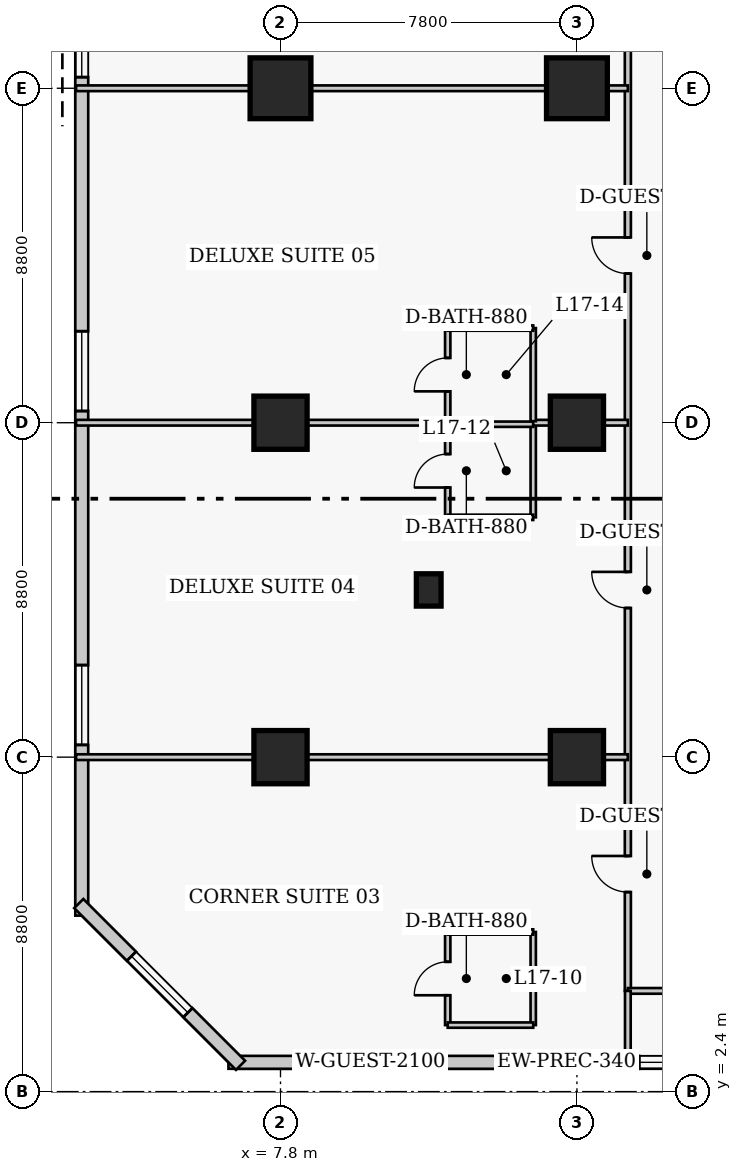
"""IFC4 building model, lengths in metres.
Left out: names, types, materials, properties, quantities, classifications, styles, units other than length and angle.
Written with IfcOpenShell. Run it as: python <this file> out.ifc"""

import sys

from ifc_helpers import new_model, si_unit, direction, frame, frame_2d, origin, origin_2d, place, context, subcontext, project, spatial, rectangle, extrude, element, fill, save


model = new_model("IFC4")
c1 = context("Model", 3, precision=1e-05, world=origin(), true_north=direction((0.0, 1.0)))
c2 = subcontext(c1, "Body", "Model", "MODEL_VIEW")
j1 = project(units=[si_unit("LENGTHUNIT", "METRE"), si_unit("PLANEANGLEUNIT", "RADIAN")], contexts=[c1])
p1 = place(None, origin())
s1 = spatial("IfcSite", under=j1, at=p1, CompositionType="ELEMENT")
p2 = place(p1, origin())
s2 = spatial("IfcBuilding", under=s1, at=p2, CompositionType="ELEMENT")
p3 = place(p2, frame((0.0, 0.0, 71.6)))
s3 = spatial("IfcBuildingStorey", under=s2, at=p3, CompositionType="ELEMENT", Elevation=71.6)
for number, where, z_axis, x_axis in (
    (1, (7.8, 11.2, 0.0), (0.0, 0.0, 1.0), (1.0, 0.0, 0.0)),
    (2, (7.8, 20.0, 0.0), (0.0, 0.0, 1.0), (1.0, 0.0, 0.0)),
):
    element("IfcColumn", number, at=place(p3, frame(where, z_axis=z_axis, x_axis=x_axis)), inside=s3, PredefinedType="COLUMN", context=c2, shape_type="SweptSolid", body=[
        extrude(rectangle(XDim=1.4, YDim=1.4, at=origin_2d()), origin(), (0.0, 0.0, 1.0), 3.8),
    ])
p4 = place(p3, frame((7.8, 28.8, 0.0), z_axis=(0.0, 0.0, 1.0), x_axis=(1.0, 0.0, 0.0)))
e3 = element("IfcColumn", 3, at=p4, inside=s3, PredefinedType="COLUMN", context=c2, shape_type="SweptSolid", body=[
    extrude(rectangle(XDim=1.6, YDim=1.6, at=origin_2d()), origin(), (0.0, 0.0, 1.0), 3.8),
])
for number, where, z_axis, x_axis in (
    (4, (15.6, 11.2, 0.0), (0.0, 0.0, 1.0), (1.0, 0.0, 0.0)),
    (5, (15.6, 20.0, 0.0), (0.0, 0.0, 1.0), (1.0, 0.0, 0.0)),
):
    element("IfcColumn", number, at=place(p3, frame(where, z_axis=z_axis, x_axis=x_axis)), inside=s3, PredefinedType="COLUMN", context=c2, shape_type="SweptSolid", body=[
        extrude(rectangle(XDim=1.4, YDim=1.4, at=origin_2d()), origin(), (0.0, 0.0, 1.0), 3.8),
    ])
p5 = place(p3, frame((15.6, 28.8, 0.0), z_axis=(0.0, 0.0, 1.0), x_axis=(1.0, 0.0, 0.0)))
e6 = element("IfcColumn", 6, at=p5, inside=s3, PredefinedType="COLUMN", context=c2, shape_type="SweptSolid", body=[
    extrude(rectangle(XDim=1.6, YDim=1.6, at=origin_2d()), origin(), (0.0, 0.0, 1.0), 3.8),
])
p6 = place(p3, frame((11.7, 15.6, 0.0), z_axis=(0.0, 0.0, 1.0), x_axis=(1.0, 0.0, 0.0)))
e7 = element("IfcColumn", 7, at=p6, inside=s3, PredefinedType="PILASTER", context=c2, shape_type="SweptSolid", body=[
    extrude(rectangle(XDim=0.65, YDim=0.85, at=origin_2d()), origin(), (0.0, 0.0, 1.0), 3.8),
])
p7 = place(p3, frame((6.43, 3.17, 0.0), z_axis=(0.0, 0.0, 1.0), x_axis=(1.0, 0.0, 0.0)))
e8 = element("IfcWall", 8, at=p7, inside=s3, PredefinedType="SOLIDWALL", context=c2, shape_type="SweptSolid", body=[
    extrude(rectangle(XDim=29.89, YDim=0.34, at=frame_2d((14.945, 0.0))), origin(), (0.0, 0.0, 1.0), 3.42),
])
p8 = place(p7, frame((20.17, 0.0, 0.0)))
e9 = element("IfcOpeningElement", 9, at=p8, cuts=e8, PredefinedType="OPENING", context=c2, shape_type="SweptSolid", body=[
    extrude(rectangle(XDim=1.4, YDim=2.15, at=frame_2d((0.7, 1.075))), frame((0.0, 0.18, 0.0), z_axis=(0.0, -1.0, 0.0), x_axis=(1.0, 0.0, 0.0)), (0.0, 0.0, 1.0), 0.36),
])
p9 = place(p7, frame((2.686, 0.0, 0.85)))
e10 = element("IfcOpeningElement", 10, at=p9, cuts=e8, PredefinedType="OPENING", context=c2, shape_type="SweptSolid", body=[
    extrude(rectangle(XDim=2.1, YDim=1.85, at=frame_2d((1.05, 0.925))), frame((0.0, 0.18, 0.0), z_axis=(0.0, -1.0, 0.0), x_axis=(1.0, 0.0, 0.0)), (0.0, 0.0, 1.0), 0.36),
])
p10 = place(p7, frame((10.809, 0.0, 0.85)))
e11 = element("IfcOpeningElement", 11, at=p10, cuts=e8, PredefinedType="OPENING", context=c2, shape_type="SweptSolid", body=[
    extrude(rectangle(XDim=2.1, YDim=1.85, at=frame_2d((1.05, 0.925))), frame((0.0, 0.18, 0.0), z_axis=(0.0, -1.0, 0.0), x_axis=(1.0, 0.0, 0.0)), (0.0, 0.0, 1.0), 0.36),
])
p11 = place(p7, frame((16.981, 0.0, 0.85)))
e12 = element("IfcOpeningElement", 12, at=p11, cuts=e8, PredefinedType="OPENING", context=c2, shape_type="SweptSolid", body=[
    extrude(rectangle(XDim=2.1, YDim=1.85, at=frame_2d((1.05, 0.925))), frame((0.0, 0.18, 0.0), z_axis=(0.0, -1.0, 0.0), x_axis=(1.0, 0.0, 0.0)), (0.0, 0.0, 1.0), 0.36),
])
p12 = place(p7, frame((25.104, 0.0, 0.85)))
e13 = element("IfcOpeningElement", 13, at=p12, cuts=e8, PredefinedType="OPENING", context=c2, shape_type="SweptSolid", body=[
    extrude(rectangle(XDim=2.1, YDim=1.85, at=frame_2d((1.05, 0.925))), frame((0.0, 0.18, 0.0), z_axis=(0.0, -1.0, 0.0), x_axis=(1.0, 0.0, 0.0)), (0.0, 0.0, 1.0), 0.36),
])
p13 = place(p3, frame((2.57, 42.17, 0.0), z_axis=(0.0, 0.0, 1.0), x_axis=(0.0, -1.0, 0.0)))
e14 = element("IfcWall", 14, at=p13, inside=s3, PredefinedType="SOLIDWALL", context=c2, shape_type="SweptSolid", body=[
    extrude(rectangle(XDim=35.14, YDim=0.34, at=frame_2d((17.57, 0.0))), origin(), (0.0, 0.0, 1.0), 3.42),
])
p14 = place(p13, frame((3.343, 0.0, 0.85)))
e15 = element("IfcOpeningElement", 15, at=p14, cuts=e14, PredefinedType="OPENING", context=c2, shape_type="SweptSolid", body=[
    extrude(rectangle(XDim=2.1, YDim=1.85, at=frame_2d((1.05, 0.925))), frame((0.0, 0.18, 0.0), z_axis=(0.0, -1.0, 0.0), x_axis=(1.0, 0.0, 0.0)), (0.0, 0.0, 1.0), 0.36),
])
p15 = place(p13, frame((10.978, 0.0, 0.85)))
e16 = element("IfcOpeningElement", 16, at=p15, cuts=e14, PredefinedType="OPENING", context=c2, shape_type="SweptSolid", body=[
    extrude(rectangle(XDim=2.1, YDim=1.85, at=frame_2d((1.05, 0.925))), frame((0.0, 0.18, 0.0), z_axis=(0.0, -1.0, 0.0), x_axis=(1.0, 0.0, 0.0)), (0.0, 0.0, 1.0), 0.36),
])
p16 = place(p13, frame((19.762, 0.0, 0.85)))
e17 = element("IfcOpeningElement", 17, at=p16, cuts=e14, PredefinedType="OPENING", context=c2, shape_type="SweptSolid", body=[
    extrude(rectangle(XDim=2.1, YDim=1.85, at=frame_2d((1.05, 0.925))), frame((0.0, 0.18, 0.0), z_axis=(0.0, -1.0, 0.0), x_axis=(1.0, 0.0, 0.0)), (0.0, 0.0, 1.0), 0.36),
])
p17 = place(p13, frame((28.548, 0.0, 0.85)))
e18 = element("IfcOpeningElement", 18, at=p17, cuts=e14, PredefinedType="OPENING", context=c2, shape_type="SweptSolid", body=[
    extrude(rectangle(XDim=2.1, YDim=1.85, at=frame_2d((1.05, 0.925))), frame((0.0, 0.18, 0.0), z_axis=(0.0, -1.0, 0.0), x_axis=(1.0, 0.0, 0.0)), (0.0, 0.0, 1.0), 0.36),
])
p18 = place(p3, frame((2.492, 7.348, 0.0), z_axis=(0.0, 0.0, 1.0), x_axis=(0.707106781187, -0.707106781187, 0.0)))
e19 = element("IfcWall", 19, at=p18, inside=s3, PredefinedType="SOLIDWALL", context=c2, shape_type="SweptSolid", body=[
    extrude(rectangle(XDim=6.02, YDim=0.34, at=frame_2d((3.01, 0.0))), origin(), (0.0, 0.0, 1.0), 3.42),
])
p19 = place(p18, frame((1.96, 0.0, 0.85)))
e20 = element("IfcOpeningElement", 20, at=p19, cuts=e19, PredefinedType="OPENING", context=c2, shape_type="SweptSolid", body=[
    extrude(rectangle(XDim=2.1, YDim=1.85, at=frame_2d((1.05, 0.925))), frame((0.0, 0.18, 0.0), z_axis=(0.0, -1.0, 0.0), x_axis=(1.0, 0.0, 0.0)), (0.0, 0.0, 1.0), 0.36),
])
p20 = place(p3, frame((16.94, 5.05, 0.0), z_axis=(0.0, 0.0, 1.0), x_axis=(0.0, 1.0, 0.0)))
e21 = element("IfcWall", 21, at=p20, inside=s3, PredefinedType="PARTITIONING", context=c2, shape_type="SweptSolid", body=[
    extrude(rectangle(XDim=35.6, YDim=0.16, at=frame_2d((17.8, 0.0))), origin(), (0.0, 0.0, 1.0), 3.42),
])
p21 = place(p20, frame((2.6, 0.0, 0.0)))
e22 = element("IfcOpeningElement", 22, at=p21, cuts=e21, PredefinedType="OPENING", context=c2, shape_type="SweptSolid", body=[
    extrude(rectangle(XDim=0.95, YDim=2.1, at=frame_2d((0.475, 1.05))), frame((0.0, 0.09, 0.0), z_axis=(0.0, -1.0, 0.0), x_axis=(1.0, 0.0, 0.0)), (0.0, 0.0, 1.0), 0.18),
])
p22 = place(p20, frame((10.075, 0.0, 0.0)))
e23 = element("IfcOpeningElement", 23, at=p22, cuts=e21, PredefinedType="OPENING", context=c2, shape_type="SweptSolid", body=[
    extrude(rectangle(XDim=0.95, YDim=2.1, at=frame_2d((0.475, 1.05))), frame((0.0, 0.09, 0.0), z_axis=(0.0, -1.0, 0.0), x_axis=(1.0, 0.0, 0.0)), (0.0, 0.0, 1.0), 0.18),
])
p23 = place(p20, frame((18.875, 0.0, 0.0)))
e24 = element("IfcOpeningElement", 24, at=p23, cuts=e21, PredefinedType="OPENING", context=c2, shape_type="SweptSolid", body=[
    extrude(rectangle(XDim=0.95, YDim=2.1, at=frame_2d((0.475, 1.05))), frame((0.0, 0.09, 0.0), z_axis=(0.0, -1.0, 0.0), x_axis=(1.0, 0.0, 0.0)), (0.0, 0.0, 1.0), 0.18),
])
p24 = place(p20, frame((26.925, 0.0, 0.0)))
e25 = element("IfcOpeningElement", 25, at=p24, cuts=e21, PredefinedType="OPENING", context=c2, shape_type="SweptSolid", body=[
    extrude(rectangle(XDim=0.95, YDim=2.1, at=frame_2d((0.475, 1.05))), frame((0.0, 0.09, 0.0), z_axis=(0.0, -1.0, 0.0), x_axis=(1.0, 0.0, 0.0)), (0.0, 0.0, 1.0), 0.18),
])
p25 = place(p20, frame((34.16, 0.0, 0.0)))
e26 = element("IfcOpeningElement", 26, at=p25, cuts=e21, PredefinedType="OPENING", context=c2, shape_type="SweptSolid", body=[
    extrude(rectangle(XDim=1.0, YDim=2.15, at=frame_2d((0.5, 1.075))), frame((0.0, 0.09, 0.0), z_axis=(0.0, -1.0, 0.0), x_axis=(1.0, 0.0, 0.0)), (0.0, 0.0, 1.0), 0.18),
])
p26 = place(p3, frame((16.94, 5.05, 0.0), z_axis=(0.0, 0.0, 1.0), x_axis=(1.0, 0.0, 0.0)))
e27 = element("IfcWall", 27, at=p26, inside=s3, PredefinedType="PARTITIONING", context=c2, shape_type="SweptSolid", body=[
    extrude(rectangle(XDim=2.22, YDim=0.15, at=frame_2d((1.11, 0.0))), origin(), (0.0, 0.0, 1.0), 3.42),
])
p27 = place(p3, frame((16.94, 3.02, 0.0), z_axis=(0.0, 0.0, 1.0), x_axis=(0.0, 1.0, 0.0)))
e28 = element("IfcWall", 28, at=p27, inside=s3, PredefinedType="PARTITIONING", context=c2, shape_type="SweptSolid", body=[
    extrude(rectangle(XDim=2.03, YDim=0.15, at=frame_2d((1.015, 0.0))), origin(), (0.0, 0.0, 1.0), 3.42),
])
p28 = place(p3, frame((12.2, 4.15, 0.0), z_axis=(0.0, 0.0, 1.0), x_axis=(0.0, 1.0, 0.0)))
e29 = element("IfcWall", 29, at=p28, inside=s3, PredefinedType="PLUMBINGWALL", context=c2, shape_type="SweptSolid", body=[
    extrude(rectangle(XDim=2.45, YDim=0.14, at=frame_2d((1.225, 0.0))), origin(), (0.0, 0.0, 1.0), 3.42),
])
p29 = place(p28, frame((0.785, 0.0, 0.0)))
e30 = element("IfcOpeningElement", 30, at=p29, cuts=e29, PredefinedType="OPENING", context=c2, shape_type="SweptSolid", body=[
    extrude(rectangle(XDim=0.88, YDim=2.05, at=frame_2d((0.44, 1.025))), frame((0.0, 0.08, 0.0), z_axis=(0.0, -1.0, 0.0), x_axis=(1.0, 0.0, 0.0)), (0.0, 0.0, 1.0), 0.16),
])
p30 = place(p3, frame((14.45, 4.15, 0.0), z_axis=(0.0, 0.0, 1.0), x_axis=(0.0, 1.0, 0.0)))
e31 = element("IfcWall", 31, at=p30, inside=s3, PredefinedType="PLUMBINGWALL", context=c2, shape_type="SweptSolid", body=[
    extrude(rectangle(XDim=2.45, YDim=0.14, at=frame_2d((1.225, 0.0))), origin(), (0.0, 0.0, 1.0), 3.42),
])
for number, where, z_axis, x_axis in (
    (32, (12.2, 4.15, 0.0), (0.0, 0.0, 1.0), (1.0, 0.0, 0.0)),
    (33, (12.2, 6.6, 0.0), (0.0, 0.0, 1.0), (1.0, 0.0, 0.0)),
):
    element("IfcWall", number, at=place(p3, frame(where, z_axis=z_axis, x_axis=x_axis)), inside=s3, PredefinedType="PLUMBINGWALL", context=c2, shape_type="SweptSolid", body=[
        extrude(rectangle(XDim=2.25, YDim=0.14, at=frame_2d((1.125, 0.0))), origin(), (0.0, 0.0, 1.0), 3.42),
    ])
p31 = place(p3, frame((2.42, 11.2, 0.0), z_axis=(0.0, 0.0, 1.0), x_axis=(1.0, 0.0, 0.0)))
e34 = element("IfcWall", 34, at=p31, inside=s3, PredefinedType="PARTITIONING", context=c2, shape_type="SweptSolid", body=[
    extrude(rectangle(XDim=14.52, YDim=0.15, at=frame_2d((7.26, 0.0))), origin(), (0.0, 0.0, 1.0), 2.473),
])
p32 = place(p3, frame((12.2, 17.51, 0.0), z_axis=(0.0, 0.0, 1.0), x_axis=(0.0, 1.0, 0.0)))
e35 = element("IfcWall", 35, at=p32, inside=s3, PredefinedType="PLUMBINGWALL", context=c2, shape_type="SweptSolid", body=[
    extrude(rectangle(XDim=2.45, YDim=0.14, at=frame_2d((1.225, 0.0))), origin(), (0.0, 0.0, 1.0), 3.42),
])
p33 = place(p32, frame((0.785, 0.0, 0.0)))
e36 = element("IfcOpeningElement", 36, at=p33, cuts=e35, PredefinedType="OPENING", context=c2, shape_type="SweptSolid", body=[
    extrude(rectangle(XDim=0.88, YDim=2.05, at=frame_2d((0.44, 1.025))), frame((0.0, 0.08, 0.0), z_axis=(0.0, -1.0, 0.0), x_axis=(1.0, 0.0, 0.0)), (0.0, 0.0, 1.0), 0.16),
])
p34 = place(p3, frame((14.45, 17.51, 0.0), z_axis=(0.0, 0.0, 1.0), x_axis=(0.0, 1.0, 0.0)))
e37 = element("IfcWall", 37, at=p34, inside=s3, PredefinedType="PLUMBINGWALL", context=c2, shape_type="SweptSolid", body=[
    extrude(rectangle(XDim=2.45, YDim=0.14, at=frame_2d((1.225, 0.0))), origin(), (0.0, 0.0, 1.0), 3.42),
])
p35 = place(p3, frame((12.2, 17.51, 0.0), z_axis=(0.0, 0.0, 1.0), x_axis=(1.0, 0.0, 0.0)))
e38 = element("IfcWall", 38, at=p35, inside=s3, PredefinedType="PLUMBINGWALL", context=c2, shape_type="SweptSolid", body=[
    extrude(rectangle(XDim=2.25, YDim=0.14, at=frame_2d((1.125, 0.0))), origin(), (0.0, 0.0, 1.0), 3.42),
])
p36 = place(p3, frame((12.2, 19.96, 0.0), z_axis=(0.0, 0.0, 1.0), x_axis=(1.0, 0.0, 0.0)))
e39 = element("IfcWall", 39, at=p36, inside=s3, PredefinedType="PLUMBINGWALL", context=c2, shape_type="SweptSolid", body=[
    extrude(rectangle(XDim=2.25, YDim=0.14, at=frame_2d((1.125, 0.0))), origin(), (0.0, 0.0, 1.0), 2.473),
])
p37 = place(p3, frame((2.42, 20.0, 0.0), z_axis=(0.0, 0.0, 1.0), x_axis=(1.0, 0.0, 0.0)))
e40 = element("IfcWall", 40, at=p37, inside=s3, PredefinedType="PARTITIONING", context=c2, shape_type="SweptSolid", body=[
    extrude(rectangle(XDim=9.78, YDim=0.15, at=frame_2d((4.89, 0.0))), origin(), (0.0, 0.0, 1.0), 2.473),
])
p38 = place(p3, frame((14.45, 20.0, 0.0), z_axis=(0.0, 0.0, 1.0), x_axis=(1.0, 0.0, 0.0)))
e41 = element("IfcWall", 41, at=p38, inside=s3, PredefinedType="PARTITIONING", context=c2, shape_type="SweptSolid", body=[
    extrude(rectangle(XDim=2.49, YDim=0.15, at=frame_2d((1.245, 0.0))), origin(), (0.0, 0.0, 1.0), 2.473),
])
p39 = place(p3, frame((12.2, 20.04, 0.0), z_axis=(0.0, 0.0, 1.0), x_axis=(0.0, 1.0, 0.0)))
e42 = element("IfcWall", 42, at=p39, inside=s3, PredefinedType="PLUMBINGWALL", context=c2, shape_type="SweptSolid", body=[
    extrude(rectangle(XDim=2.45, YDim=0.14, at=frame_2d((1.225, 0.0))), origin(), (0.0, 0.0, 1.0), 3.42),
])
p40 = place(p39, frame((0.785, 0.0, 0.0)))
e43 = element("IfcOpeningElement", 43, at=p40, cuts=e42, PredefinedType="OPENING", context=c2, shape_type="SweptSolid", body=[
    extrude(rectangle(XDim=0.88, YDim=2.05, at=frame_2d((0.44, 1.025))), frame((0.0, 0.08, 0.0), z_axis=(0.0, -1.0, 0.0), x_axis=(1.0, 0.0, 0.0)), (0.0, 0.0, 1.0), 0.16),
])
p41 = place(p3, frame((14.45, 20.04, 0.0), z_axis=(0.0, 0.0, 1.0), x_axis=(0.0, 1.0, 0.0)))
e44 = element("IfcWall", 44, at=p41, inside=s3, PredefinedType="PLUMBINGWALL", context=c2, shape_type="SweptSolid", body=[
    extrude(rectangle(XDim=2.45, YDim=0.14, at=frame_2d((1.225, 0.0))), origin(), (0.0, 0.0, 1.0), 3.42),
])
p42 = place(p3, frame((12.2, 22.49, 0.0), z_axis=(0.0, 0.0, 1.0), x_axis=(1.0, 0.0, 0.0)))
e45 = element("IfcWall", 45, at=p42, inside=s3, PredefinedType="PLUMBINGWALL", context=c2, shape_type="SweptSolid", body=[
    extrude(rectangle(XDim=2.25, YDim=0.14, at=frame_2d((1.125, 0.0))), origin(), (0.0, 0.0, 1.0), 3.42),
])
p43 = place(p3, frame((2.42, 28.8, 0.0), z_axis=(0.0, 0.0, 1.0), x_axis=(1.0, 0.0, 0.0)))
e46 = element("IfcWall", 46, at=p43, inside=s3, PredefinedType="PARTITIONING", context=c2, shape_type="SweptSolid", body=[
    extrude(rectangle(XDim=14.52, YDim=0.15, at=frame_2d((7.26, 0.0))), origin(), (0.0, 0.0, 1.0), 2.473),
])
p44 = place(p9, origin())
e47 = element("IfcWindow", 47, at=p44, inside=s3, PartitioningType="SINGLE_PANEL", PredefinedType="WINDOW", context=c2, shape_type="SweptSolid", body=[
    extrude(rectangle(XDim=2.1, YDim=1.85, at=frame_2d((1.05, 0.925))), frame((0.0, 0.03, 0.0), z_axis=(0.0, -1.0, 0.0), x_axis=(1.0, 0.0, 0.0)), (0.0, 0.0, 1.0), 0.06),
])
fill(e10, e47)
p45 = place(p10, origin())
e48 = element("IfcWindow", 48, at=p45, inside=s3, PartitioningType="SINGLE_PANEL", PredefinedType="WINDOW", context=c2, shape_type="SweptSolid", body=[
    extrude(rectangle(XDim=2.1, YDim=1.85, at=frame_2d((1.05, 0.925))), frame((0.0, 0.03, 0.0), z_axis=(0.0, -1.0, 0.0), x_axis=(1.0, 0.0, 0.0)), (0.0, 0.0, 1.0), 0.06),
])
fill(e11, e48)
p46 = place(p15, origin())
e49 = element("IfcWindow", 49, at=p46, inside=s3, PartitioningType="SINGLE_PANEL", PredefinedType="WINDOW", context=c2, shape_type="SweptSolid", body=[
    extrude(rectangle(XDim=2.1, YDim=1.85, at=frame_2d((1.05, 0.925))), frame((0.0, 0.03, 0.0), z_axis=(0.0, -1.0, 0.0), x_axis=(1.0, 0.0, 0.0)), (0.0, 0.0, 1.0), 0.06),
])
fill(e16, e49)
p47 = place(p16, origin())
e50 = element("IfcWindow", 50, at=p47, inside=s3, PartitioningType="SINGLE_PANEL", PredefinedType="WINDOW", context=c2, shape_type="SweptSolid", body=[
    extrude(rectangle(XDim=2.1, YDim=1.85, at=frame_2d((1.05, 0.925))), frame((0.0, 0.03, 0.0), z_axis=(0.0, -1.0, 0.0), x_axis=(1.0, 0.0, 0.0)), (0.0, 0.0, 1.0), 0.06),
])
fill(e17, e50)
p48 = place(p17, origin())
e51 = element("IfcWindow", 51, at=p48, inside=s3, PartitioningType="SINGLE_PANEL", PredefinedType="WINDOW", context=c2, shape_type="SweptSolid", body=[
    extrude(rectangle(XDim=2.1, YDim=1.85, at=frame_2d((1.05, 0.925))), frame((0.0, 0.03, 0.0), z_axis=(0.0, -1.0, 0.0), x_axis=(1.0, 0.0, 0.0)), (0.0, 0.0, 1.0), 0.06),
])
fill(e18, e51)
p49 = place(p19, origin())
e52 = element("IfcWindow", 52, at=p49, inside=s3, PartitioningType="SINGLE_PANEL", PredefinedType="WINDOW", context=c2, shape_type="SweptSolid", body=[
    extrude(rectangle(XDim=2.1, YDim=1.85, at=frame_2d((1.05, 0.925))), frame((0.0, 0.03, 0.0), z_axis=(0.0, -1.0, 0.0), x_axis=(1.0, 0.0, 0.0)), (0.0, 0.0, 1.0), 0.06),
])
fill(e20, e52)
p50 = place(p29, origin())
e53 = element("IfcDoor", 53, at=p50, inside=s3, OperationType="SINGLE_SWING_LEFT", PredefinedType="DOOR", context=c2, shape_type="SweptSolid", body=[
    extrude(rectangle(XDim=0.88, YDim=2.05, at=frame_2d((0.44, 1.025))), frame((0.0, 0.025, 0.0), z_axis=(0.0, -1.0, 0.0), x_axis=(1.0, 0.0, 0.0)), (0.0, 0.0, 1.0), 0.05),
])
fill(e30, e53)
p51 = place(p21, origin())
e54 = element("IfcDoor", 54, at=p51, inside=s3, OperationType="SINGLE_SWING_RIGHT", PredefinedType="DOOR", context=c2, shape_type="SweptSolid", body=[
    extrude(rectangle(XDim=0.95, YDim=2.1, at=frame_2d((0.475, 1.05))), frame((0.0, 0.025, 0.0), z_axis=(0.0, -1.0, 0.0), x_axis=(1.0, 0.0, 0.0)), (0.0, 0.0, 1.0), 0.05),
])
fill(e22, e54)
p52 = place(p33, origin())
e55 = element("IfcDoor", 55, at=p52, inside=s3, OperationType="SINGLE_SWING_LEFT", PredefinedType="DOOR", context=c2, shape_type="SweptSolid", body=[
    extrude(rectangle(XDim=0.88, YDim=2.05, at=frame_2d((0.44, 1.025))), frame((0.0, 0.025, 0.0), z_axis=(0.0, -1.0, 0.0), x_axis=(1.0, 0.0, 0.0)), (0.0, 0.0, 1.0), 0.05),
])
fill(e36, e55)
p53 = place(p22, origin())
e56 = element("IfcDoor", 56, at=p53, inside=s3, OperationType="SINGLE_SWING_RIGHT", PredefinedType="DOOR", context=c2, shape_type="SweptSolid", body=[
    extrude(rectangle(XDim=0.95, YDim=2.1, at=frame_2d((0.475, 1.05))), frame((0.0, 0.025, 0.0), z_axis=(0.0, -1.0, 0.0), x_axis=(1.0, 0.0, 0.0)), (0.0, 0.0, 1.0), 0.05),
])
fill(e23, e56)
p54 = place(p40, origin())
e57 = element("IfcDoor", 57, at=p54, inside=s3, OperationType="SINGLE_SWING_LEFT", PredefinedType="DOOR", context=c2, shape_type="SweptSolid", body=[
    extrude(rectangle(XDim=0.88, YDim=2.05, at=frame_2d((0.44, 1.025))), frame((0.0, 0.025, 0.0), z_axis=(0.0, -1.0, 0.0), x_axis=(1.0, 0.0, 0.0)), (0.0, 0.0, 1.0), 0.05),
])
fill(e43, e57)
p55 = place(p23, origin())
e58 = element("IfcDoor", 58, at=p55, inside=s3, OperationType="SINGLE_SWING_RIGHT", PredefinedType="DOOR", context=c2, shape_type="SweptSolid", body=[
    extrude(rectangle(XDim=0.95, YDim=2.1, at=frame_2d((0.475, 1.05))), frame((0.0, 0.025, 0.0), z_axis=(0.0, -1.0, 0.0), x_axis=(1.0, 0.0, 0.0)), (0.0, 0.0, 1.0), 0.05),
])
fill(e24, e58)
save(model, sys.argv[1])
